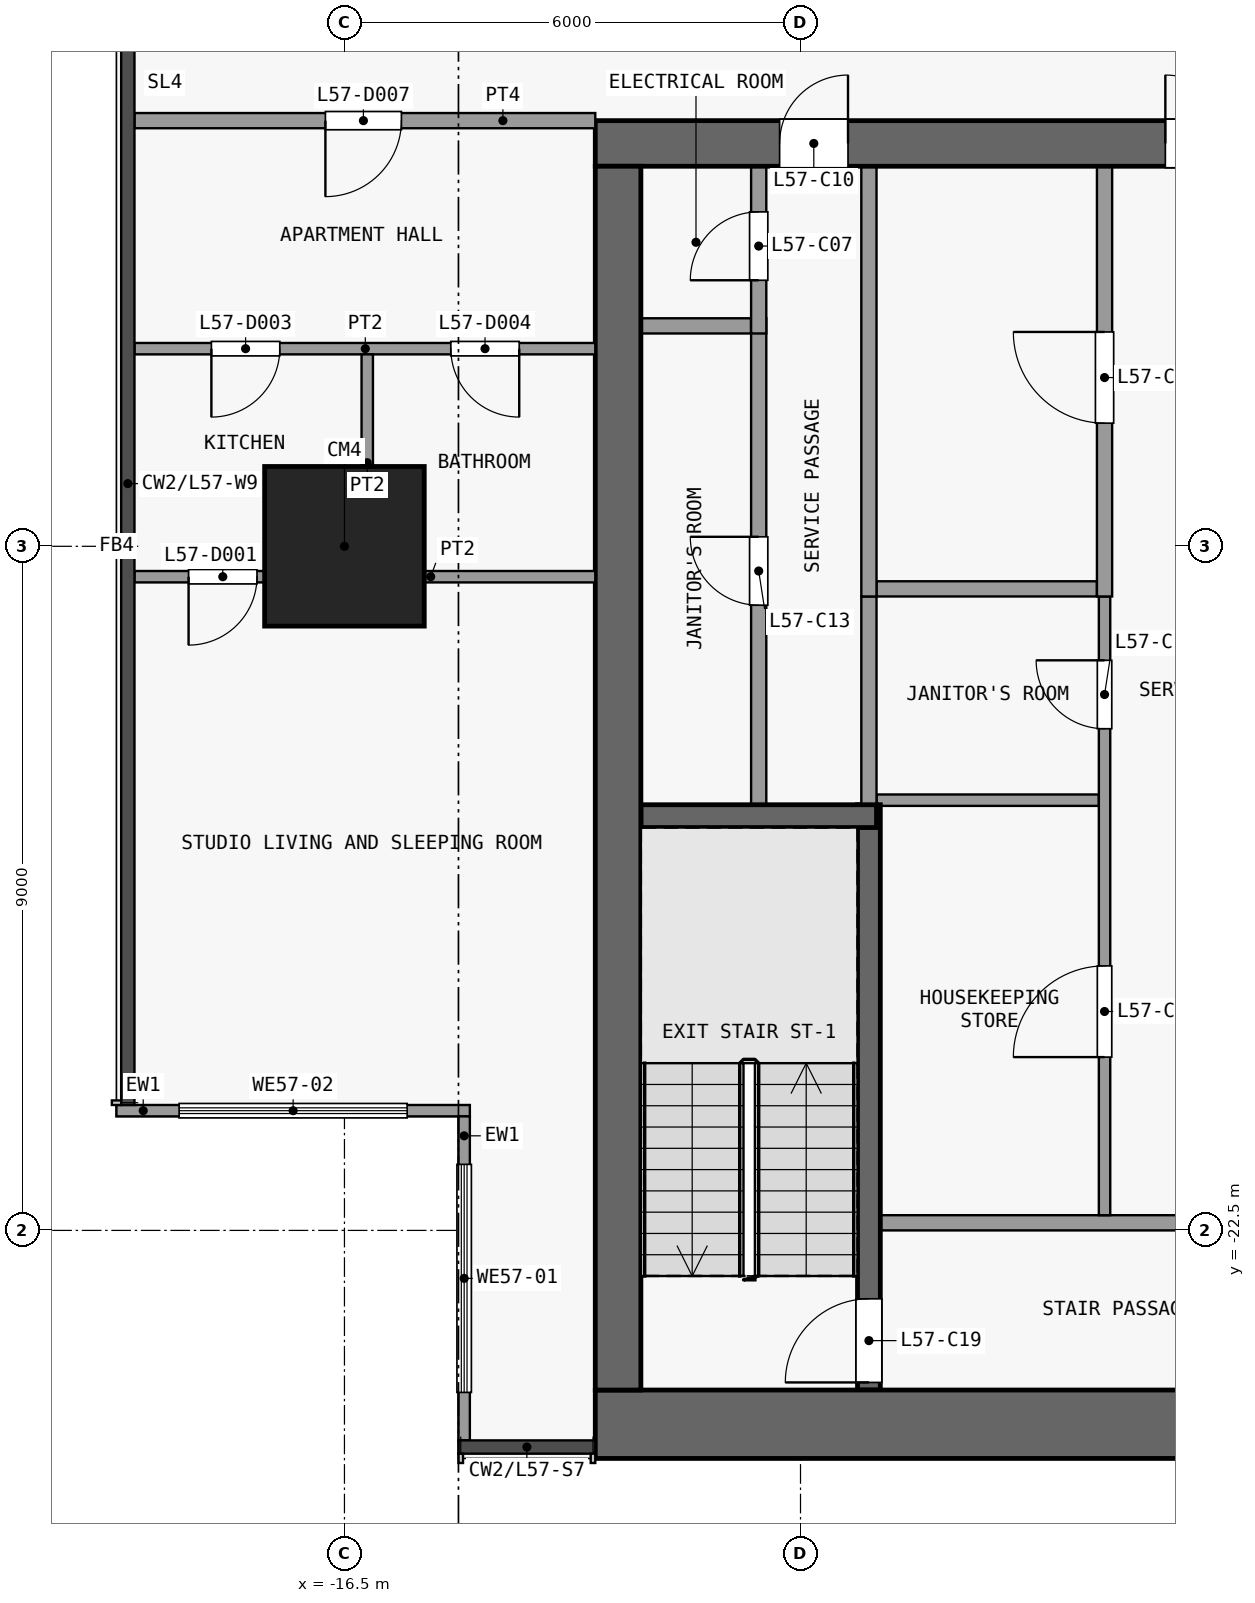
"""IFC4 building model, lengths in metres.
Left out: names, types, materials, properties, quantities, classifications, styles, units other than length and angle.
Written with IfcOpenShell. Run it as: python <this file> out.ifc"""

import sys

from ifc_helpers import new_model, si_unit, direction, frame, frame_2d, origin, origin_2d, place, context, subcontext, project, spatial, rectangle, extrude, element, fill, save


model = new_model("IFC4")
c1 = context("Model", 3, precision=1e-05, world=origin(), true_north=direction((0.0, 1.0)))
c2 = subcontext(c1, "Body", "Model", "MODEL_VIEW")
j1 = project(units=[si_unit("LENGTHUNIT", "METRE"), si_unit("PLANEANGLEUNIT", "RADIAN")], contexts=[c1])
p1 = place(None, origin())
s1 = spatial("IfcSite", under=j1, at=p1, CompositionType="ELEMENT")
p2 = place(p1, origin())
s2 = spatial("IfcBuilding", under=s1, at=p2, CompositionType="ELEMENT")
p3 = place(p2, frame((0.0, 0.0, 226.7)))
s3 = spatial("IfcBuildingStorey", under=s2, at=p3, CompositionType="ELEMENT", Elevation=226.7)
p4 = place(p3, frame((-16.5, -13.5, 0.0), z_axis=(0.0, 0.0, 1.0), x_axis=(1.0, 0.0, 0.0)))
e1 = element("IfcColumn", 1, at=p4, inside=s3, PredefinedType="COLUMN", context=c2, shape_type="SweptSolid", body=[
    extrude(rectangle(XDim=2.1, YDim=2.1, at=origin_2d()), origin(), (0.0, 0.0, 1.0), 3.6),
])
p5 = place(p3, frame((-13.2, -25.05, 0.0), z_axis=(0.0, 0.0, 1.0), x_axis=(1.0, 0.0, 0.0)))
e2 = element("IfcWall", 2, at=p5, inside=s3, PredefinedType="SHEAR", context=c2, shape_type="SweptSolid", body=[
    extrude(rectangle(XDim=26.4, YDim=0.9, at=frame_2d((13.2, 0.0))), origin(), (0.0, 0.0, 1.0), 3.3),
])
p6 = place(p3, frame((-13.2, -8.2, 0.0), z_axis=(0.0, 0.0, 1.0), x_axis=(1.0, 0.0, 0.0)))
e3 = element("IfcWall", 3, at=p6, inside=s3, PredefinedType="SHEAR", context=c2, shape_type="SweptSolid", body=[
    extrude(rectangle(XDim=26.4, YDim=0.6, at=frame_2d((13.2, 0.0))), origin(), (0.0, 0.0, 1.0), 3.3),
])
p7 = place(p6, frame((7.5, 0.0, 0.0)))
e4 = element("IfcOpeningElement", 4, at=p7, cuts=e3, PredefinedType="OPENING", context=c2, shape_type="SweptSolid", body=[
    extrude(rectangle(XDim=1.8, YDim=2.1, at=frame_2d((0.9, 1.05))), frame((0.0, 0.31, 0.0), z_axis=(0.0, -1.0, 0.0), x_axis=(1.0, 0.0, 0.0)), (0.0, 0.0, 1.0), 0.62),
])
p8 = place(p6, frame((17.1, 0.0, 0.0)))
e5 = element("IfcOpeningElement", 5, at=p8, cuts=e3, PredefinedType="OPENING", context=c2, shape_type="SweptSolid", body=[
    extrude(rectangle(XDim=1.8, YDim=2.1, at=frame_2d((0.9, 1.05))), frame((0.0, 0.31, 0.0), z_axis=(0.0, -1.0, 0.0), x_axis=(1.0, 0.0, 0.0)), (0.0, 0.0, 1.0), 0.62),
])
p9 = place(p6, frame((2.425, 0.0, 0.0)))
e6 = element("IfcOpeningElement", 6, at=p9, cuts=e3, PredefinedType="OPENING", context=c2, shape_type="SweptSolid", body=[
    extrude(rectangle(XDim=0.9, YDim=2.1, at=frame_2d((0.45, 1.05))), frame((0.0, 0.31, 0.0), z_axis=(0.0, -1.0, 0.0), x_axis=(1.0, 0.0, 0.0)), (0.0, 0.0, 1.0), 0.62),
])
p10 = place(p6, frame((23.075, 0.0, 0.0)))
e7 = element("IfcOpeningElement", 7, at=p10, cuts=e3, PredefinedType="OPENING", context=c2, shape_type="SweptSolid", body=[
    extrude(rectangle(XDim=0.9, YDim=2.1, at=frame_2d((0.45, 1.05))), frame((0.0, 0.31, 0.0), z_axis=(0.0, -1.0, 0.0), x_axis=(1.0, 0.0, 0.0)), (0.0, 0.0, 1.0), 0.62),
])
p11 = place(p3, frame((-12.9, -24.6, 0.0), z_axis=(0.0, 0.0, 1.0), x_axis=(0.0, 1.0, 0.0)))
e8 = element("IfcWall", 8, at=p11, inside=s3, PredefinedType="SHEAR", context=c2, shape_type="SweptSolid", body=[
    extrude(rectangle(XDim=16.1, YDim=0.6, at=frame_2d((8.05, 0.0))), origin(), (0.0, 0.0, 1.0), 3.3),
])
p12 = place(p3, frame((-3.25, -22.4, 0.0), z_axis=(0.0, 0.0, 1.0), x_axis=(-1.0, 0.0, 0.0)))
e9 = element("IfcWall", 9, at=p12, inside=s3, PredefinedType="PARTITIONING", context=c2, shape_type="SweptSolid", body=[
    extrude(rectangle(XDim=6.2, YDim=0.2, at=frame_2d((3.1, 0.0))), origin(), (0.0, 0.0, 1.0), 3.3),
])
p13 = place(p12, frame((0.8, 0.0, 0.0)))
e10 = element("IfcOpeningElement", 10, at=p13, cuts=e9, PredefinedType="OPENING", context=c2, shape_type="SweptSolid", body=[
    extrude(rectangle(XDim=1.5, YDim=2.1, at=frame_2d((0.75, 1.05))), frame((0.0, 0.11, 0.0), z_axis=(0.0, -1.0, 0.0), x_axis=(1.0, 0.0, 0.0)), (0.0, 0.0, 1.0), 0.22),
])
p14 = place(p3, frame((-12.6, -17.05, 0.0), z_axis=(0.0, 0.0, 1.0), x_axis=(1.0, 0.0, 0.0)))
e11 = element("IfcWall", 11, at=p14, inside=s3, PredefinedType="SHEAR", context=c2, shape_type="SweptSolid", body=[
    extrude(rectangle(XDim=3.1, YDim=0.3, at=frame_2d((1.55, 0.0))), origin(), (0.0, 0.0, 1.0), 3.3),
])
p15 = place(p3, frame((-9.5, -16.84, 0.0), z_axis=(0.0, 0.0, 1.0), x_axis=(1.0, 0.0, 0.0)))
e12 = element("IfcWall", 12, at=p15, inside=s3, PredefinedType="PARTITIONING", context=c2, shape_type="SweptSolid", body=[
    extrude(rectangle(XDim=2.925, YDim=0.15, at=frame_2d((1.462, 0.0))), origin(), (0.0, 0.0, 1.0), 3.3),
])
p16 = place(p3, frame((-9.5, -14.06, 0.0), z_axis=(0.0, 0.0, 1.0), x_axis=(1.0, 0.0, 0.0)))
e13 = element("IfcWall", 13, at=p16, inside=s3, PredefinedType="PARTITIONING", context=c2, shape_type="SweptSolid", body=[
    extrude(rectangle(XDim=2.9, YDim=0.2, at=frame_2d((1.45, 0.0))), origin(), (0.0, 0.0, 1.0), 3.3),
])
p17 = place(p3, frame((-12.6, -10.6, 0.0), z_axis=(0.0, 0.0, 1.0), x_axis=(1.0, 0.0, 0.0)))
e14 = element("IfcWall", 14, at=p17, inside=s3, PredefinedType="PARTITIONING", context=c2, shape_type="SweptSolid", body=[
    extrude(rectangle(XDim=1.45, YDim=0.2, at=frame_2d((0.725, 0.0))), origin(), (0.0, 0.0, 1.0), 3.3),
])
p18 = place(p3, frame((-11.05, -16.9, 0.0), z_axis=(0.0, 0.0, 1.0), x_axis=(0.0, 1.0, 0.0)))
e15 = element("IfcWall", 15, at=p18, inside=s3, PredefinedType="PARTITIONING", context=c2, shape_type="SweptSolid", body=[
    extrude(rectangle(XDim=6.4, YDim=0.2, at=frame_2d((3.2, 0.0))), origin(), (0.0, 0.0, 1.0), 3.3),
])
p19 = place(p18, frame((2.625, 0.0, 0.0)))
e16 = element("IfcOpeningElement", 16, at=p19, cuts=e15, PredefinedType="OPENING", context=c2, shape_type="SweptSolid", body=[
    extrude(rectangle(XDim=0.9, YDim=2.1, at=frame_2d((0.45, 1.05))), frame((0.0, 0.11, 0.0), z_axis=(0.0, -1.0, 0.0), x_axis=(1.0, 0.0, 0.0)), (0.0, 0.0, 1.0), 0.22),
])
p20 = place(p3, frame((-11.05, -10.7, 0.0), z_axis=(0.0, 0.0, 1.0), x_axis=(0.0, 1.0, 0.0)))
e17 = element("IfcWall", 17, at=p20, inside=s3, PredefinedType="PARTITIONING", context=c2, shape_type="SweptSolid", body=[
    extrude(rectangle(XDim=2.2, YDim=0.2, at=frame_2d((1.1, 0.0))), origin(), (0.0, 0.0, 1.0), 3.3),
])
p21 = place(p20, frame((0.7, 0.0, 0.0)))
e18 = element("IfcOpeningElement", 18, at=p21, cuts=e17, PredefinedType="OPENING", context=c2, shape_type="SweptSolid", body=[
    extrude(rectangle(XDim=0.9, YDim=2.1, at=frame_2d((0.45, 1.05))), frame((0.0, 0.11, 0.0), z_axis=(0.0, -1.0, 0.0), x_axis=(1.0, 0.0, 0.0)), (0.0, 0.0, 1.0), 0.22),
])
p22 = place(p3, frame((-9.6, -24.6, 0.0), z_axis=(0.0, 0.0, 1.0), x_axis=(0.0, 1.0, 0.0)))
e19 = element("IfcWall", 19, at=p22, inside=s3, PredefinedType="SHEAR", context=c2, shape_type="SweptSolid", body=[
    extrude(rectangle(XDim=7.7, YDim=0.3, at=frame_2d((3.85, 0.0))), origin(), (0.0, 0.0, 1.0), 3.3),
])
p23 = place(p22, frame((0.1, 0.0, 0.0)))
e20 = element("IfcOpeningElement", 20, at=p23, cuts=e19, PredefinedType="OPENING", context=c2, shape_type="SweptSolid", body=[
    extrude(rectangle(XDim=1.1, YDim=2.1, at=frame_2d((0.55, 1.05))), frame((0.0, 0.16, 0.0), z_axis=(0.0, -1.0, 0.0), x_axis=(1.0, 0.0, 0.0)), (0.0, 0.0, 1.0), 0.32),
])
p24 = place(p3, frame((-9.6, -16.9, 0.0), z_axis=(0.0, 0.0, 1.0), x_axis=(0.0, 1.0, 0.0)))
e21 = element("IfcWall", 21, at=p24, inside=s3, PredefinedType="PARTITIONING", context=c2, shape_type="SweptSolid", body=[
    extrude(rectangle(XDim=2.74, YDim=0.2, at=frame_2d((1.37, 0.0))), origin(), (0.0, 0.0, 1.0), 3.3),
])
p25 = place(p3, frame((-9.6, -14.16, 0.0), z_axis=(0.0, 0.0, 1.0), x_axis=(0.0, 1.0, 0.0)))
e22 = element("IfcWall", 22, at=p25, inside=s3, PredefinedType="PARTITIONING", context=c2, shape_type="SweptSolid", body=[
    extrude(rectangle(XDim=5.66, YDim=0.2, at=frame_2d((2.83, 0.0))), origin(), (0.0, 0.0, 1.0), 3.3),
])
p26 = place(p3, frame((-6.5, -22.3, 0.0), z_axis=(0.0, 0.0, 1.0), x_axis=(0.0, 1.0, 0.0)))
e23 = element("IfcWall", 23, at=p26, inside=s3, PredefinedType="PARTITIONING", context=c2, shape_type="SweptSolid", body=[
    extrude(rectangle(XDim=8.14, YDim=0.15, at=frame_2d((4.07, 0.0))), origin(), (0.0, 0.0, 1.0), 3.3),
])
p27 = place(p26, frame((2.08, 0.0, 0.0)))
e24 = element("IfcOpeningElement", 24, at=p27, cuts=e23, PredefinedType="OPENING", context=c2, shape_type="SweptSolid", body=[
    extrude(rectangle(XDim=1.2, YDim=2.1, at=frame_2d((0.6, 1.05))), frame((0.0, 0.085, 0.0), z_axis=(0.0, -1.0, 0.0), x_axis=(1.0, 0.0, 0.0)), (0.0, 0.0, 1.0), 0.17),
])
p28 = place(p26, frame((6.4, 0.0, 0.0)))
e25 = element("IfcOpeningElement", 25, at=p28, cuts=e23, PredefinedType="OPENING", context=c2, shape_type="SweptSolid", body=[
    extrude(rectangle(XDim=0.9, YDim=2.1, at=frame_2d((0.45, 1.05))), frame((0.0, 0.085, 0.0), z_axis=(0.0, -1.0, 0.0), x_axis=(1.0, 0.0, 0.0)), (0.0, 0.0, 1.0), 0.17),
])
p29 = place(p3, frame((-6.5, -14.16, 0.0), z_axis=(0.0, 0.0, 1.0), x_axis=(0.0, 1.0, 0.0)))
e26 = element("IfcWall", 26, at=p29, inside=s3, PredefinedType="PARTITIONING", context=c2, shape_type="SweptSolid", body=[
    extrude(rectangle(XDim=5.66, YDim=0.2, at=frame_2d((2.83, 0.0))), origin(), (0.0, 0.0, 1.0), 3.3),
])
p30 = place(p29, frame((2.28, 0.0, 0.0)))
e27 = element("IfcOpeningElement", 27, at=p30, cuts=e26, PredefinedType="OPENING", context=c2, shape_type="SweptSolid", body=[
    extrude(rectangle(XDim=1.2, YDim=2.1, at=frame_2d((0.6, 1.05))), frame((0.0, 0.11, 0.0), z_axis=(0.0, -1.0, 0.0), x_axis=(1.0, 0.0, 0.0)), (0.0, 0.0, 1.0), 0.22),
])
p31 = place(p3, frame((-14.925, -25.262, 0.0), z_axis=(0.0, 0.0, 1.0), x_axis=(0.0, 1.0, 0.0)))
e28 = element("IfcWall", 28, at=p31, inside=s3, PredefinedType="SOLIDWALL", context=c2, shape_type="SweptSolid", body=[
    extrude(rectangle(XDim=4.262, YDim=0.15, at=frame_2d((2.131, 0.0))), origin(), (0.0, 0.0, 1.0), 3.3),
])
p32 = place(p31, frame((0.631, 0.0, 0.9)))
e29 = element("IfcOpeningElement", 29, at=p32, cuts=e28, PredefinedType="OPENING", context=c2, shape_type="SweptSolid", body=[
    extrude(rectangle(XDim=3.0, YDim=2.4, at=frame_2d((1.5, 1.2))), frame((0.0, 0.085, 0.0), z_axis=(0.0, -1.0, 0.0), x_axis=(1.0, 0.0, 0.0)), (0.0, 0.0, 1.0), 0.17),
])
p33 = place(p3, frame((-14.85, -20.925, 0.0), z_axis=(0.0, 0.0, 1.0), x_axis=(-1.0, 0.0, 0.0)))
e30 = element("IfcWall", 30, at=p33, inside=s3, PredefinedType="SOLIDWALL", context=c2, shape_type="SweptSolid", body=[
    extrude(rectangle(XDim=4.65, YDim=0.15, at=frame_2d((2.325, 0.0))), origin(), (0.0, 0.0, 1.0), 3.3),
])
p34 = place(p33, frame((0.825, 0.0, 0.9)))
e31 = element("IfcOpeningElement", 31, at=p34, cuts=e30, PredefinedType="OPENING", context=c2, shape_type="SweptSolid", body=[
    extrude(rectangle(XDim=3.0, YDim=2.4, at=frame_2d((1.5, 1.2))), frame((0.0, 0.085, 0.0), z_axis=(0.0, -1.0, 0.0), x_axis=(1.0, 0.0, 0.0)), (0.0, 0.0, 1.0), 0.17),
])
p35 = place(p3, frame((-19.262, -13.9, 0.0), z_axis=(0.0, 0.0, 1.0), x_axis=(1.0, 0.0, 0.0)))
e32 = element("IfcWall", 32, at=p35, inside=s3, PredefinedType="PARTITIONING", context=c2, shape_type="SweptSolid", body=[
    extrude(rectangle(XDim=6.062, YDim=0.15, at=frame_2d((3.031, 0.0))), origin(), (0.0, 0.0, 1.0), 3.3),
])
p36 = place(p35, frame((0.712, 0.0, 0.0)))
e33 = element("IfcOpeningElement", 33, at=p36, cuts=e32, PredefinedType="OPENING", context=c2, shape_type="SweptSolid", body=[
    extrude(rectangle(XDim=0.9, YDim=2.1, at=frame_2d((0.45, 1.05))), frame((0.0, 0.085, 0.0), z_axis=(0.0, -1.0, 0.0), x_axis=(1.0, 0.0, 0.0)), (0.0, 0.0, 1.0), 0.17),
])
p37 = place(p3, frame((-19.262, -10.9, 0.0), z_axis=(0.0, 0.0, 1.0), x_axis=(1.0, 0.0, 0.0)))
e34 = element("IfcWall", 34, at=p37, inside=s3, PredefinedType="PARTITIONING", context=c2, shape_type="SweptSolid", body=[
    extrude(rectangle(XDim=6.062, YDim=0.15, at=frame_2d((3.031, 0.0))), origin(), (0.0, 0.0, 1.0), 3.3),
])
p38 = place(p37, frame((1.012, 0.0, 0.0)))
e35 = element("IfcOpeningElement", 35, at=p38, cuts=e34, PredefinedType="OPENING", context=c2, shape_type="SweptSolid", body=[
    extrude(rectangle(XDim=0.9, YDim=2.1, at=frame_2d((0.45, 1.05))), frame((0.0, 0.085, 0.0), z_axis=(0.0, -1.0, 0.0), x_axis=(1.0, 0.0, 0.0)), (0.0, 0.0, 1.0), 0.17),
])
p39 = place(p37, frame((4.162, 0.0, 0.0)))
e36 = element("IfcOpeningElement", 36, at=p39, cuts=e34, PredefinedType="OPENING", context=c2, shape_type="SweptSolid", body=[
    extrude(rectangle(XDim=0.9, YDim=2.1, at=frame_2d((0.45, 1.05))), frame((0.0, 0.085, 0.0), z_axis=(0.0, -1.0, 0.0), x_axis=(1.0, 0.0, 0.0)), (0.0, 0.0, 1.0), 0.17),
])
p40 = place(p3, frame((-19.262, -7.9, 0.0), z_axis=(0.0, 0.0, 1.0), x_axis=(1.0, 0.0, 0.0)))
e37 = element("IfcWall", 37, at=p40, inside=s3, PredefinedType="PARTITIONING", context=c2, shape_type="SweptSolid", body=[
    extrude(rectangle(XDim=6.062, YDim=0.2, at=frame_2d((3.031, 0.0))), origin(), (0.0, 0.0, 1.0), 3.3),
])
p41 = place(p40, frame((2.512, 0.0, 0.0)))
e38 = element("IfcOpeningElement", 38, at=p41, cuts=e37, PredefinedType="OPENING", context=c2, shape_type="SweptSolid", body=[
    extrude(rectangle(XDim=1.0, YDim=2.1, at=frame_2d((0.5, 1.05))), frame((0.0, 0.11, 0.0), z_axis=(0.0, -1.0, 0.0), x_axis=(1.0, 0.0, 0.0)), (0.0, 0.0, 1.0), 0.22),
])
p42 = place(p3, frame((-16.2, -13.825, 0.0), z_axis=(0.0, 0.0, 1.0), x_axis=(0.0, 1.0, 0.0)))
e39 = element("IfcWall", 39, at=p42, inside=s3, PredefinedType="PARTITIONING", context=c2, shape_type="SweptSolid", body=[
    extrude(rectangle(XDim=2.85, YDim=0.15, at=frame_2d((1.425, 0.0))), origin(), (0.0, 0.0, 1.0), 3.3),
])
p43 = place(p7, origin())
e40 = element("IfcDoor", 40, at=p43, inside=s3, OperationType="DOUBLE_DOOR_SINGLE_SWING", PredefinedType="DOOR", context=c2, shape_type="SweptSolid", body=[
    extrude(rectangle(XDim=1.8, YDim=2.1, at=frame_2d((0.9, 1.05))), frame((0.0, 0.025, 0.0), z_axis=(0.0, -1.0, 0.0), x_axis=(1.0, 0.0, 0.0)), (0.0, 0.0, 1.0), 0.05),
])
fill(e4, e40)
p44 = place(p21, origin())
e41 = element("IfcDoor", 41, at=p44, inside=s3, OperationType="SINGLE_SWING_LEFT", PredefinedType="DOOR", context=c2, shape_type="SweptSolid", body=[
    extrude(rectangle(XDim=0.9, YDim=2.1, at=frame_2d((0.45, 1.05))), frame((0.0, 0.025, 0.0), z_axis=(0.0, -1.0, 0.0), x_axis=(1.0, 0.0, 0.0)), (0.0, 0.0, 1.0), 0.05),
])
fill(e18, e41)
p45 = place(p30, origin())
e42 = element("IfcDoor", 42, at=p45, inside=s3, OperationType="SINGLE_SWING_RIGHT", PredefinedType="DOOR", context=c2, shape_type="SweptSolid", body=[
    extrude(rectangle(XDim=1.2, YDim=2.1, at=frame_2d((0.6, 1.05))), frame((0.0, 0.025, 0.0), z_axis=(0.0, -1.0, 0.0), x_axis=(1.0, 0.0, 0.0)), (0.0, 0.0, 1.0), 0.05),
])
fill(e27, e42)
p46 = place(p9, origin())
e43 = element("IfcDoor", 43, at=p46, inside=s3, OperationType="SINGLE_SWING_RIGHT", PredefinedType="DOOR", context=c2, shape_type="SweptSolid", body=[
    extrude(rectangle(XDim=0.9, YDim=2.1, at=frame_2d((0.45, 1.05))), frame((0.0, 0.025, 0.0), z_axis=(0.0, -1.0, 0.0), x_axis=(1.0, 0.0, 0.0)), (0.0, 0.0, 1.0), 0.05),
])
fill(e6, e43)
p47 = place(p19, origin())
e44 = element("IfcDoor", 44, at=p47, inside=s3, OperationType="SINGLE_SWING_RIGHT", PredefinedType="DOOR", context=c2, shape_type="SweptSolid", body=[
    extrude(rectangle(XDim=0.9, YDim=2.1, at=frame_2d((0.45, 1.05))), frame((0.0, 0.025, 0.0), z_axis=(0.0, -1.0, 0.0), x_axis=(1.0, 0.0, 0.0)), (0.0, 0.0, 1.0), 0.05),
])
fill(e16, e44)
p48 = place(p27, origin())
e45 = element("IfcDoor", 45, at=p48, inside=s3, OperationType="SINGLE_SWING_LEFT", PredefinedType="DOOR", context=c2, shape_type="SweptSolid", body=[
    extrude(rectangle(XDim=1.2, YDim=2.1, at=frame_2d((0.6, 1.05))), frame((0.0, 0.025, 0.0), z_axis=(0.0, -1.0, 0.0), x_axis=(1.0, 0.0, 0.0)), (0.0, 0.0, 1.0), 0.05),
])
fill(e24, e45)
p49 = place(p28, origin())
e46 = element("IfcDoor", 46, at=p49, inside=s3, OperationType="SINGLE_SWING_RIGHT", PredefinedType="DOOR", context=c2, shape_type="SweptSolid", body=[
    extrude(rectangle(XDim=0.9, YDim=2.1, at=frame_2d((0.45, 1.05))), frame((0.0, 0.025, 0.0), z_axis=(0.0, -1.0, 0.0), x_axis=(1.0, 0.0, 0.0)), (0.0, 0.0, 1.0), 0.05),
])
fill(e25, e46)
p50 = place(p23, origin())
e47 = element("IfcDoor", 47, at=p50, inside=s3, OperationType="SINGLE_SWING_LEFT", PredefinedType="DOOR", context=c2, shape_type="SweptSolid", body=[
    extrude(rectangle(XDim=1.1, YDim=2.1, at=frame_2d((0.55, 1.05))), frame((0.0, 0.025, 0.0), z_axis=(0.0, -1.0, 0.0), x_axis=(1.0, 0.0, 0.0)), (0.0, 0.0, 1.0), 0.05),
])
fill(e20, e47)
p51 = place(p32, origin())
e48 = element("IfcWindow", 48, at=p51, inside=s3, PartitioningType="SINGLE_PANEL", PredefinedType="WINDOW", context=c2, shape_type="SweptSolid", body=[
    extrude(rectangle(XDim=3.0, YDim=2.4, at=frame_2d((1.5, 1.2))), frame((0.0, 0.03, 0.0), z_axis=(0.0, -1.0, 0.0), x_axis=(1.0, 0.0, 0.0)), (0.0, 0.0, 1.0), 0.06),
])
fill(e29, e48)
p52 = place(p34, origin())
e49 = element("IfcWindow", 49, at=p52, inside=s3, PartitioningType="SINGLE_PANEL", PredefinedType="WINDOW", context=c2, shape_type="SweptSolid", body=[
    extrude(rectangle(XDim=3.0, YDim=2.4, at=frame_2d((1.5, 1.2))), frame((0.0, 0.03, 0.0), z_axis=(0.0, -1.0, 0.0), x_axis=(1.0, 0.0, 0.0)), (0.0, 0.0, 1.0), 0.06),
])
fill(e31, e49)
p53 = place(p36, origin())
e50 = element("IfcDoor", 50, at=p53, inside=s3, OperationType="SINGLE_SWING_LEFT", PredefinedType="DOOR", context=c2, shape_type="SweptSolid", body=[
    extrude(rectangle(XDim=0.9, YDim=2.1, at=frame_2d((0.45, 1.05))), frame((0.0, 0.025, 0.0), z_axis=(0.0, -1.0, 0.0), x_axis=(1.0, 0.0, 0.0)), (0.0, 0.0, 1.0), 0.05),
])
fill(e33, e50)
p54 = place(p38, origin())
e51 = element("IfcDoor", 51, at=p54, inside=s3, OperationType="SINGLE_SWING_LEFT", PredefinedType="DOOR", context=c2, shape_type="SweptSolid", body=[
    extrude(rectangle(XDim=0.9, YDim=2.1, at=frame_2d((0.45, 1.05))), frame((0.0, 0.025, 0.0), z_axis=(0.0, -1.0, 0.0), x_axis=(1.0, 0.0, 0.0)), (0.0, 0.0, 1.0), 0.05),
])
fill(e35, e51)
p55 = place(p39, origin())
e52 = element("IfcDoor", 52, at=p55, inside=s3, OperationType="SINGLE_SWING_RIGHT", PredefinedType="DOOR", context=c2, shape_type="SweptSolid", body=[
    extrude(rectangle(XDim=0.9, YDim=2.1, at=frame_2d((0.45, 1.05))), frame((0.0, 0.025, 0.0), z_axis=(0.0, -1.0, 0.0), x_axis=(1.0, 0.0, 0.0)), (0.0, 0.0, 1.0), 0.05),
])
fill(e36, e52)
p56 = place(p41, origin())
e53 = element("IfcDoor", 53, at=p56, inside=s3, OperationType="SINGLE_SWING_LEFT", PredefinedType="DOOR", context=c2, shape_type="SweptSolid", body=[
    extrude(rectangle(XDim=1.0, YDim=2.1, at=frame_2d((0.5, 1.05))), frame((0.0, 0.025, 0.0), z_axis=(0.0, -1.0, 0.0), x_axis=(1.0, 0.0, 0.0)), (0.0, 0.0, 1.0), 0.05),
])
fill(e38, e53)
save(model, sys.argv[1])
